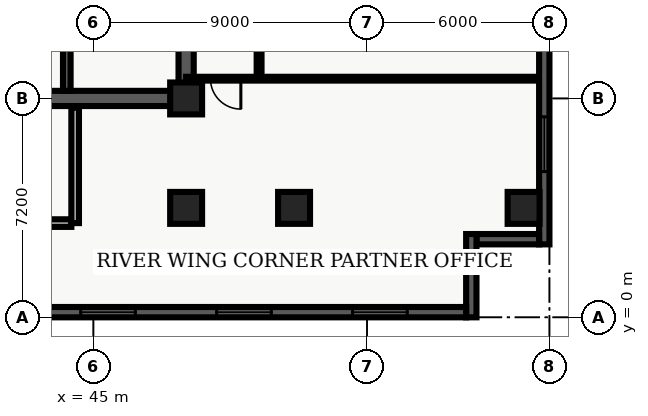
"""IFC4 building model, lengths in metres.
Left out: names, types, materials, properties, quantities, classifications, styles, units other than length and angle.
Written with IfcOpenShell. Run it as: python <this file> out.ifc"""

import sys

from ifc_helpers import new_model, entity, si_unit, converted_unit, direction, frame, origin_with_axes, origin_2d_with_axis, place, context, subcontext, project, spatial, polyline, rectangle, outline, extrude, element, fill, save


model = new_model("IFC4")
c1 = context("Model", 3, precision=1e-05, world=origin_with_axes(), true_north=direction((0.0, 1.0)))
c2 = subcontext(c1, "Body", "Model", "MODEL_VIEW")
j1 = project(units=[si_unit("LENGTHUNIT", "METRE"), converted_unit("PLANEANGLEUNIT", "DEGREE", entity("IfcPlaneAngleMeasure", 0.017), si_unit("PLANEANGLEUNIT", "RADIAN"), dimensions=[0, 0, 0, 0, 0, 0, 0])], contexts=[c1])
p1 = place(None, origin_with_axes())
s1 = spatial("IfcSite", under=j1, at=p1, CompositionType="ELEMENT")
p2 = place(p1, origin_with_axes())
s2 = spatial("IfcBuilding", under=s1, at=p2, CompositionType="ELEMENT")
p3 = place(p2, frame((0.0, 0.0, 132.9), z_axis=(0.0, 0.0, 1.0), x_axis=(1.0, 0.0, 0.0)))
s3 = spatial("IfcBuildingStorey", under=s2, at=p3, CompositionType="ELEMENT", Elevation=132.9)
p4 = place(p3, frame((40.2, 7.2, 0.0), z_axis=(0.0, 0.0, 1.0), x_axis=(1.0, 0.0, 0.0)))
e1 = element("IfcWall", 1, at=p4, inside=s3, PredefinedType="SHEAR", context=c2, shape_type="SweptSolid", body=[
    extrude(outline(polyline([(0.0, -0.25), (7.85, -0.25), (7.85, 0.25), (0.0, 0.25), (0.0, -0.25)])), origin_with_axes(), (0.0, 0.0, 1.0), 3.66),
])
p5 = place(p4, frame((2.175, 0.0, 0.0), z_axis=(0.0, 0.0, 1.0), x_axis=(1.0, 0.0, 0.0)))
e2 = element("IfcOpeningElement", 2, at=p5, cuts=e1, PredefinedType="OPENING", context=c2, shape_type="SweptSolid", body=[
    extrude(rectangle(XDim=1.05, YDim=0.52, at=origin_2d_with_axis()), origin_with_axes(), (0.0, 0.0, 1.0), 2.15),
])
p6 = place(p3, frame((48.05, 7.2, 0.0), z_axis=(0.0, 0.0, 1.0), x_axis=(0.0, 1.0, 0.0)))
e3 = element("IfcWall", 3, at=p6, inside=s3, PredefinedType="SHEAR", context=c2, shape_type="SweptSolid", body=[
    extrude(outline(polyline([(0.0, -0.25), (15.6, -0.25), (15.6, 0.25), (0.0, 0.25), (0.0, -0.25)])), origin_with_axes(), (0.0, 0.0, 1.0), 3.66),
])
p7 = place(p6, frame((5.975, 0.0, 0.0), z_axis=(0.0, 0.0, 1.0), x_axis=(1.0, 0.0, 0.0)))
e4 = element("IfcOpeningElement", 4, at=p7, cuts=e3, PredefinedType="OPENING", context=c2, shape_type="SweptSolid", body=[
    extrude(rectangle(XDim=1.05, YDim=0.52, at=origin_2d_with_axis()), origin_with_axes(), (0.0, 0.0, 1.0), 2.15),
])
p8 = place(p6, frame((2.725, 0.0, 0.0), z_axis=(0.0, 0.0, 1.0), x_axis=(1.0, 0.0, 0.0)))
e5 = element("IfcOpeningElement", 5, at=p8, cuts=e3, PredefinedType="OPENING", context=c2, shape_type="SweptSolid", body=[
    extrude(rectangle(XDim=0.95, YDim=0.52, at=origin_2d_with_axis()), origin_with_axes(), (0.0, 0.0, 1.0), 2.15),
])
p9 = place(p3, frame((44.125, 7.45, 0.0), z_axis=(0.0, 0.0, 1.0), x_axis=(0.0, 1.0, 0.0)))
e6 = element("IfcWall", 6, at=p9, inside=s3, PredefinedType="SHEAR", context=c2, shape_type="SweptSolid", body=[
    extrude(outline(polyline([(0.0, -0.125), (15.1, -0.125), (15.1, 0.125), (0.0, 0.125), (0.0, -0.125)])), origin_with_axes(), (0.0, 0.0, 1.0), 3.66),
])
p10 = place(p3, frame((40.325, 3.1, 0.0), z_axis=(0.0, 0.0, 1.0), x_axis=(1.0, 0.0, 0.0)))
e7 = element("IfcWall", 7, at=p10, inside=s3, PredefinedType="SOLIDWALL", context=c2, shape_type="SweptSolid", body=[
    extrude(outline(polyline([(0.0, -0.125), (3.95, -0.125), (3.95, 0.125), (0.0, 0.125), (0.0, -0.125)])), origin_with_axes(), (0.0, 0.0, 1.0), 2.7),
])
p11 = place(p3, frame((44.4, 3.1, 0.0), z_axis=(0.0, 0.0, 1.0), x_axis=(0.0, 1.0, 0.0)))
e8 = element("IfcWall", 8, at=p11, inside=s3, PredefinedType="SOLIDWALL", context=c2, shape_type="SweptSolid", body=[
    extrude(outline(polyline([(0.0, -0.125), (3.8, -0.125), (3.8, 0.125), (0.0, 0.125), (0.0, -0.125)])), origin_with_axes(), (0.0, 0.0, 1.0), 2.7),
])
for number, where, z_axis, x_axis in (
    (9, (48.05, 3.6, 0.0), (0.0, 0.0, 1.0), (1.0, 0.0, 0.0)),
    (10, (48.05, 7.2, 0.0), (0.0, 0.0, 1.0), (1.0, 0.0, 0.0)),
    (11, (51.6, 3.6, 0.0), (0.0, 0.0, 1.0), (1.0, 0.0, 0.0)),
    (12, (59.15, 3.6, 0.0), (0.0, 0.0, 1.0), (1.0, 0.0, 0.0)),
):
    element("IfcColumn", number, at=place(p3, frame(where, z_axis=z_axis, x_axis=x_axis)), inside=s3, PredefinedType="COLUMN", context=c2, shape_type="SweptSolid", body=[
        extrude(rectangle(XDim=1.05, YDim=1.05, at=origin_2d_with_axis()), origin_with_axes(), (0.0, 0.0, 1.0), 3.9),
    ])
p12 = place(p3, frame((50.45, 7.85, 0.0), z_axis=(0.0, 0.0, 1.0), x_axis=(0.0, 1.0, 0.0)))
e13 = element("IfcWall", 13, at=p12, inside=s3, PredefinedType="PARTITIONING", context=c2, shape_type="SweptSolid", body=[
    extrude(outline(polyline([(0.0, -0.08), (18.8, -0.08), (18.8, 0.08), (0.0, 0.08), (0.0, -0.08)])), origin_with_axes(), (0.0, 0.0, 1.0), 2.7),
])
p13 = place(p12, frame((7.75, 0.0, 0.0), z_axis=(0.0, 0.0, 1.0), x_axis=(1.0, 0.0, 0.0)))
e14 = element("IfcOpeningElement", 14, at=p13, cuts=e13, PredefinedType="OPENING", context=c2, shape_type="SweptSolid", body=[
    extrude(rectangle(XDim=1.0, YDim=0.18, at=origin_2d_with_axis()), origin_with_axes(), (0.0, 0.0, 1.0), 2.15),
])
p14 = place(p3, frame((59.665, 7.85, 0.0), z_axis=(0.0, 0.0, 1.0), x_axis=(-1.0, 0.0, 0.0)))
e15 = element("IfcWall", 15, at=p14, inside=s3, PredefinedType="PARTITIONING", context=c2, shape_type="SweptSolid", body=[
    extrude(outline(polyline([(0.0, -0.062), (11.615, -0.062), (11.615, 0.062), (0.0, 0.062), (0.0, -0.062)])), origin_with_axes(), (0.0, 0.0, 1.0), 2.7),
])
p15 = place(p14, frame((10.315, 0.0, 0.0), z_axis=(0.0, 0.0, 1.0), x_axis=(1.0, 0.0, 0.0)))
e16 = element("IfcOpeningElement", 16, at=p15, cuts=e15, PredefinedType="OPENING", context=c2, shape_type="SweptSolid", body=[
    extrude(rectangle(XDim=1.0, YDim=0.145, at=origin_2d_with_axis()), origin_with_axes(), (0.0, 0.0, 1.0), 2.15),
])
p16 = place(p3, frame((59.83, 26.06, 0.0), z_axis=(0.0, 0.0, 1.0), x_axis=(0.0, -1.0, 0.0)))
e17 = element("IfcWall", 17, at=p16, inside=s3, PredefinedType="SOLIDWALL", context=c2, shape_type="SweptSolid", body=[
    extrude(outline(polyline([(0.0, -0.17), (23.66, -0.17), (23.66, 0.17), (0.0, 0.17), (0.0, -0.17)])), origin_with_axes(), (0.0, 0.0, 1.0), 3.66),
])
p17 = place(p16, frame((3.696, 0.0, 0.45), z_axis=(0.0, 0.0, 1.0), x_axis=(1.0, 0.0, 0.0)))
e18 = element("IfcOpeningElement", 18, at=p17, cuts=e17, PredefinedType="OPENING", context=c2, shape_type="SweptSolid", body=[
    extrude(rectangle(XDim=1.8, YDim=0.36, at=origin_2d_with_axis()), origin_with_axes(), (0.0, 0.0, 1.0), 2.1),
])
p18 = place(p16, frame((11.83, 0.0, 0.45), z_axis=(0.0, 0.0, 1.0), x_axis=(1.0, 0.0, 0.0)))
e19 = element("IfcOpeningElement", 19, at=p18, cuts=e17, PredefinedType="OPENING", context=c2, shape_type="SweptSolid", body=[
    extrude(rectangle(XDim=1.8, YDim=0.36, at=origin_2d_with_axis()), origin_with_axes(), (0.0, 0.0, 1.0), 2.1),
])
p19 = place(p16, frame((20.364, 0.0, 0.45), z_axis=(0.0, 0.0, 1.0), x_axis=(1.0, 0.0, 0.0)))
e20 = element("IfcOpeningElement", 20, at=p19, cuts=e17, PredefinedType="OPENING", context=c2, shape_type="SweptSolid", body=[
    extrude(rectangle(XDim=1.8, YDim=0.36, at=origin_2d_with_axis()), origin_with_axes(), (0.0, 0.0, 1.0), 2.1),
])
p20 = place(p3, frame((59.66, 2.57, 0.0), z_axis=(0.0, 0.0, 1.0), x_axis=(-1.0, 0.0, 0.0)))
e21 = element("IfcWall", 21, at=p20, inside=s3, PredefinedType="SOLIDWALL", context=c2, shape_type="SweptSolid", body=[
    extrude(outline(polyline([(0.0, -0.17), (2.06, -0.17), (2.06, 0.17), (0.0, 0.17), (0.0, -0.17)])), origin_with_axes(), (0.0, 0.0, 1.0), 3.66),
])
p21 = place(p3, frame((57.43, 2.74, 0.0), z_axis=(0.0, 0.0, 1.0), x_axis=(0.0, -1.0, 0.0)))
e22 = element("IfcWall", 22, at=p21, inside=s3, PredefinedType="SOLIDWALL", context=c2, shape_type="SweptSolid", body=[
    extrude(outline(polyline([(0.0, -0.17), (2.74, -0.17), (2.74, 0.17), (0.0, 0.17), (0.0, -0.17)])), origin_with_axes(), (0.0, 0.0, 1.0), 3.66),
])
p22 = place(p3, frame((57.26, 0.17, 0.0), z_axis=(0.0, 0.0, 1.0), x_axis=(-1.0, 0.0, 0.0)))
e23 = element("IfcWall", 23, at=p22, inside=s3, PredefinedType="SOLIDWALL", context=c2, shape_type="SweptSolid", body=[
    extrude(outline(polyline([(0.0, -0.17), (54.86, -0.17), (54.86, 0.17), (0.0, 0.17), (0.0, -0.17)])), origin_with_axes(), (0.0, 0.0, 1.0), 3.66),
])
p23 = place(p22, frame((2.836, 0.0, 0.45), z_axis=(0.0, 0.0, 1.0), x_axis=(1.0, 0.0, 0.0)))
e24 = element("IfcOpeningElement", 24, at=p23, cuts=e23, PredefinedType="OPENING", context=c2, shape_type="SweptSolid", body=[
    extrude(rectangle(XDim=1.8, YDim=0.36, at=origin_2d_with_axis()), origin_with_axes(), (0.0, 0.0, 1.0), 2.1),
])
p24 = place(p22, frame((7.307, 0.0, 0.45), z_axis=(0.0, 0.0, 1.0), x_axis=(1.0, 0.0, 0.0)))
e25 = element("IfcOpeningElement", 25, at=p24, cuts=e23, PredefinedType="OPENING", context=c2, shape_type="SweptSolid", body=[
    extrude(rectangle(XDim=1.8, YDim=0.36, at=origin_2d_with_axis()), origin_with_axes(), (0.0, 0.0, 1.0), 2.1),
])
p25 = place(p22, frame((11.779, 0.0, 0.45), z_axis=(0.0, 0.0, 1.0), x_axis=(1.0, 0.0, 0.0)))
e26 = element("IfcOpeningElement", 26, at=p25, cuts=e23, PredefinedType="OPENING", context=c2, shape_type="SweptSolid", body=[
    extrude(rectangle(XDim=1.8, YDim=0.36, at=origin_2d_with_axis()), origin_with_axes(), (0.0, 0.0, 1.0), 2.1),
])
p26 = place(p22, frame((16.251, 0.0, 0.45), z_axis=(0.0, 0.0, 1.0), x_axis=(1.0, 0.0, 0.0)))
e27 = element("IfcOpeningElement", 27, at=p26, cuts=e23, PredefinedType="OPENING", context=c2, shape_type="SweptSolid", body=[
    extrude(rectangle(XDim=1.8, YDim=0.36, at=origin_2d_with_axis()), origin_with_axes(), (0.0, 0.0, 1.0), 2.1),
])
p27 = place(p22, frame((20.723, 0.0, 0.45), z_axis=(0.0, 0.0, 1.0), x_axis=(1.0, 0.0, 0.0)))
e28 = element("IfcOpeningElement", 28, at=p27, cuts=e23, PredefinedType="OPENING", context=c2, shape_type="SweptSolid", body=[
    extrude(rectangle(XDim=1.8, YDim=0.36, at=origin_2d_with_axis()), origin_with_axes(), (0.0, 0.0, 1.0), 2.1),
])
p28 = place(p22, frame((30.516, 0.0, 0.45), z_axis=(0.0, 0.0, 1.0), x_axis=(1.0, 0.0, 0.0)))
e29 = element("IfcOpeningElement", 29, at=p28, cuts=e23, PredefinedType="OPENING", context=c2, shape_type="SweptSolid", body=[
    extrude(rectangle(XDim=1.8, YDim=0.36, at=origin_2d_with_axis()), origin_with_axes(), (0.0, 0.0, 1.0), 2.1),
])
p29 = place(p22, frame((34.138, 0.0, 0.45), z_axis=(0.0, 0.0, 1.0), x_axis=(1.0, 0.0, 0.0)))
e30 = element("IfcOpeningElement", 30, at=p29, cuts=e23, PredefinedType="OPENING", context=c2, shape_type="SweptSolid", body=[
    extrude(rectangle(XDim=1.8, YDim=0.36, at=origin_2d_with_axis()), origin_with_axes(), (0.0, 0.0, 1.0), 2.1),
])
p30 = place(p22, frame((38.609, 0.0, 0.45), z_axis=(0.0, 0.0, 1.0), x_axis=(1.0, 0.0, 0.0)))
e31 = element("IfcOpeningElement", 31, at=p30, cuts=e23, PredefinedType="OPENING", context=c2, shape_type="SweptSolid", body=[
    extrude(rectangle(XDim=1.8, YDim=0.36, at=origin_2d_with_axis()), origin_with_axes(), (0.0, 0.0, 1.0), 2.1),
])
p31 = place(p22, frame((43.531, 0.0, 0.45), z_axis=(0.0, 0.0, 1.0), x_axis=(1.0, 0.0, 0.0)))
e32 = element("IfcOpeningElement", 32, at=p31, cuts=e23, PredefinedType="OPENING", context=c2, shape_type="SweptSolid", body=[
    extrude(rectangle(XDim=1.8, YDim=0.36, at=origin_2d_with_axis()), origin_with_axes(), (0.0, 0.0, 1.0), 2.1),
])
p32 = place(p22, frame((47.553, 0.0, 0.45), z_axis=(0.0, 0.0, 1.0), x_axis=(1.0, 0.0, 0.0)))
e33 = element("IfcOpeningElement", 33, at=p32, cuts=e23, PredefinedType="OPENING", context=c2, shape_type="SweptSolid", body=[
    extrude(rectangle(XDim=1.8, YDim=0.36, at=origin_2d_with_axis()), origin_with_axes(), (0.0, 0.0, 1.0), 2.1),
])
p33 = place(p22, frame((52.474, 0.0, 0.45), z_axis=(0.0, 0.0, 1.0), x_axis=(1.0, 0.0, 0.0)))
e34 = element("IfcOpeningElement", 34, at=p33, cuts=e23, PredefinedType="OPENING", context=c2, shape_type="SweptSolid", body=[
    extrude(rectangle(XDim=1.8, YDim=0.36, at=origin_2d_with_axis()), origin_with_axes(), (0.0, 0.0, 1.0), 2.1),
])
p34 = place(p14, frame((10.315, 0.0, 0.0), z_axis=(0.0, 0.0, 1.0), x_axis=(1.0, 0.0, 0.0)))
e35 = element("IfcDoor", 35, at=p34, inside=s3, OperationType="SINGLE_SWING_LEFT", PredefinedType="DOOR", context=c2, shape_type="SweptSolid", body=[
    extrude(rectangle(XDim=1.0, YDim=0.075, at=origin_2d_with_axis()), origin_with_axes(), (0.0, 0.0, 1.0), 2.15),
])
fill(e16, e35)
p35 = place(p16, frame((20.364, 0.0, 0.45), z_axis=(0.0, 0.0, 1.0), x_axis=(1.0, 0.0, 0.0)))
e36 = element("IfcWindow", 36, at=p35, inside=s3, PredefinedType="WINDOW", context=c2, shape_type="SweptSolid", body=[
    extrude(rectangle(XDim=1.8, YDim=0.09, at=origin_2d_with_axis()), origin_with_axes(), (0.0, 0.0, 1.0), 2.1),
])
fill(e20, e36)
p36 = place(p22, frame((2.836, 0.0, 0.45), z_axis=(0.0, 0.0, 1.0), x_axis=(1.0, 0.0, 0.0)))
e37 = element("IfcWindow", 37, at=p36, inside=s3, PredefinedType="WINDOW", context=c2, shape_type="SweptSolid", body=[
    extrude(rectangle(XDim=1.8, YDim=0.09, at=origin_2d_with_axis()), origin_with_axes(), (0.0, 0.0, 1.0), 2.1),
])
fill(e24, e37)
p37 = place(p22, frame((7.307, 0.0, 0.45), z_axis=(0.0, 0.0, 1.0), x_axis=(1.0, 0.0, 0.0)))
e38 = element("IfcWindow", 38, at=p37, inside=s3, PredefinedType="WINDOW", context=c2, shape_type="SweptSolid", body=[
    extrude(rectangle(XDim=1.8, YDim=0.09, at=origin_2d_with_axis()), origin_with_axes(), (0.0, 0.0, 1.0), 2.1),
])
fill(e25, e38)
p38 = place(p22, frame((11.779, 0.0, 0.45), z_axis=(0.0, 0.0, 1.0), x_axis=(1.0, 0.0, 0.0)))
e39 = element("IfcWindow", 39, at=p38, inside=s3, PredefinedType="WINDOW", context=c2, shape_type="SweptSolid", body=[
    extrude(rectangle(XDim=1.8, YDim=0.09, at=origin_2d_with_axis()), origin_with_axes(), (0.0, 0.0, 1.0), 2.1),
])
fill(e26, e39)
save(model, sys.argv[1])
